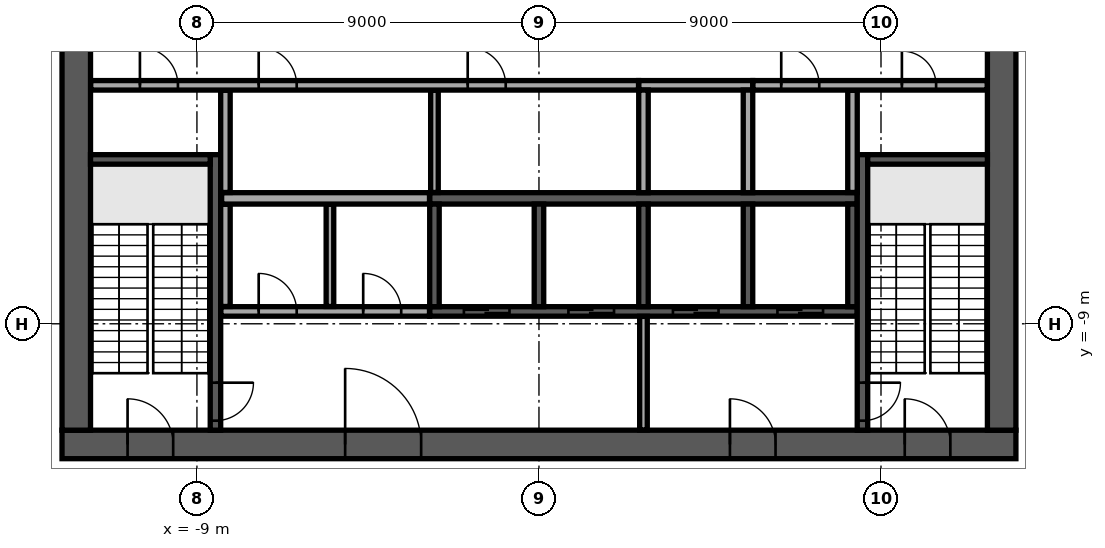
"""IFC4 building model, lengths in metres.
Left out: names, types, materials, properties, quantities, classifications, styles, units other than length and angle.
Written with IfcOpenShell. Run it as: python <this file> out.ifc"""

import sys

from ifc_helpers import new_model, si_unit, direction, frame, frame_2d, origin, place, context, subcontext, project, spatial, rectangle, extrude, element, fill, save


model = new_model("IFC4")
c1 = context("Model", 3, precision=1e-05, world=origin(), true_north=direction((0.0, 1.0)))
c2 = subcontext(c1, "Body", "Model", "MODEL_VIEW")
j1 = project(units=[si_unit("LENGTHUNIT", "METRE"), si_unit("PLANEANGLEUNIT", "RADIAN")], contexts=[c1])
p1 = place(None, origin())
s1 = spatial("IfcSite", under=j1, at=p1, CompositionType="ELEMENT")
p2 = place(p1, origin())
s2 = spatial("IfcBuilding", under=s1, at=p2, CompositionType="ELEMENT")
p3 = place(p2, frame((0.0, 0.0, 290.9)))
s3 = spatial("IfcBuildingStorey", under=s2, at=p3, CompositionType="ELEMENT", Elevation=290.9)
p4 = place(p3, frame((-12.55, -12.175, 0.0), z_axis=(0.0, 0.0, 1.0), x_axis=(1.0, 0.0, 0.0)))
e1 = element("IfcWall", 1, at=p4, inside=s3, PredefinedType="SHEAR", context=c2, shape_type="SweptSolid", body=[
    extrude(rectangle(XDim=25.1, YDim=0.75, at=frame_2d((12.55, 0.0))), origin(), (0.0, 0.0, 1.0), 5.25),
])
p5 = place(p4, frame((7.45, 0.0, 0.0)))
e2 = element("IfcOpeningElement", 2, at=p5, cuts=e1, PredefinedType="OPENING", context=c2, shape_type="SweptSolid", body=[
    extrude(rectangle(XDim=2.0, YDim=2.1, at=frame_2d((1.0, 1.05))), frame((0.0, 0.385, 0.0), z_axis=(0.0, -1.0, 0.0), x_axis=(1.0, 0.0, 0.0)), (0.0, 0.0, 1.0), 0.77),
])
p6 = place(p4, frame((17.575, 0.0, 0.0)))
e3 = element("IfcOpeningElement", 3, at=p6, cuts=e1, PredefinedType="OPENING", context=c2, shape_type="SweptSolid", body=[
    extrude(rectangle(XDim=1.2, YDim=2.1, at=frame_2d((0.6, 1.05))), frame((0.0, 0.385, 0.0), z_axis=(0.0, -1.0, 0.0), x_axis=(1.0, 0.0, 0.0)), (0.0, 0.0, 1.0), 0.77),
])
p7 = place(p4, frame((1.725, 0.0, 0.0)))
e4 = element("IfcOpeningElement", 4, at=p7, cuts=e1, PredefinedType="OPENING", context=c2, shape_type="SweptSolid", body=[
    extrude(rectangle(XDim=1.2, YDim=2.1, at=frame_2d((0.6, 1.05))), frame((0.0, 0.385, 0.0), z_axis=(0.0, -1.0, 0.0), x_axis=(1.0, 0.0, 0.0)), (0.0, 0.0, 1.0), 0.77),
])
p8 = place(p4, frame((22.175, 0.0, 0.0)))
e5 = element("IfcOpeningElement", 5, at=p8, cuts=e1, PredefinedType="OPENING", context=c2, shape_type="SweptSolid", body=[
    extrude(rectangle(XDim=1.2, YDim=2.1, at=frame_2d((0.6, 1.05))), frame((0.0, 0.385, 0.0), z_axis=(0.0, -1.0, 0.0), x_axis=(1.0, 0.0, 0.0)), (0.0, 0.0, 1.0), 0.77),
])
p9 = place(p3, frame((12.175, -11.8, 0.0), z_axis=(0.0, 0.0, 1.0), x_axis=(0.0, 1.0, 0.0)))
e6 = element("IfcWall", 6, at=p9, inside=s3, PredefinedType="SHEAR", context=c2, shape_type="SweptSolid", body=[
    extrude(rectangle(XDim=23.6, YDim=0.75, at=frame_2d((11.8, 0.0))), origin(), (0.0, 0.0, 1.0), 5.25),
])
p10 = place(p9, frame((10.6, 0.0, 0.0)))
e7 = element("IfcOpeningElement", 7, at=p10, cuts=e6, PredefinedType="OPENING", context=c2, shape_type="SweptSolid", body=[
    extrude(rectangle(XDim=2.4, YDim=2.4, at=frame_2d((1.2, 1.2))), frame((0.0, 0.385, 0.0), z_axis=(0.0, -1.0, 0.0), x_axis=(1.0, 0.0, 0.0)), (0.0, 0.0, 1.0), 0.77),
])
p11 = place(p3, frame((-12.175, -11.8, 0.0), z_axis=(0.0, 0.0, 1.0), x_axis=(0.0, 1.0, 0.0)))
e8 = element("IfcWall", 8, at=p11, inside=s3, PredefinedType="SHEAR", context=c2, shape_type="SweptSolid", body=[
    extrude(rectangle(XDim=23.6, YDim=0.75, at=frame_2d((11.8, 0.0))), origin(), (0.0, 0.0, 1.0), 5.25),
])
p12 = place(p11, frame((10.6, 0.0, 0.0)))
e9 = element("IfcOpeningElement", 9, at=p12, cuts=e8, PredefinedType="OPENING", context=c2, shape_type="SweptSolid", body=[
    extrude(rectangle(XDim=2.4, YDim=2.4, at=frame_2d((1.2, 1.2))), frame((0.0, 0.385, 0.0), z_axis=(0.0, -1.0, 0.0), x_axis=(1.0, 0.0, 0.0)), (0.0, 0.0, 1.0), 0.77),
])
p13 = place(p3, frame((-2.875, -5.7, 0.0), z_axis=(0.0, 0.0, 1.0), x_axis=(1.0, 0.0, 0.0)))
e10 = element("IfcWall", 10, at=p13, inside=s3, PredefinedType="SOLIDWALL", context=c2, shape_type="SweptSolid", body=[
    extrude(rectangle(XDim=11.25, YDim=0.3, at=frame_2d((5.625, 0.0))), origin(), (0.0, 0.0, 1.0), 5.25),
])
p14 = place(p3, frame((2.625, -2.725, 0.0), z_axis=(0.0, 0.0, 1.0), x_axis=(1.0, 0.0, 0.0)))
e11 = element("IfcWall", 11, at=p14, inside=s3, PredefinedType="SOLIDWALL", context=c2, shape_type="SweptSolid", body=[
    extrude(rectangle(XDim=3.0, YDim=0.25, at=frame_2d((1.5, 0.0))), origin(), (0.0, 0.0, 1.0), 5.25),
])
for number, where, z_axis, x_axis in (
    (12, (2.75, -5.55, 0.0), (0.0, 0.0, 1.0), (0.0, 1.0, 0.0)),
    (13, (5.5, -5.55, 0.0), (0.0, 0.0, 1.0), (0.0, 1.0, 0.0)),
):
    element("IfcWall", number, at=place(p3, frame(where, z_axis=z_axis, x_axis=x_axis)), inside=s3, PredefinedType="SOLIDWALL", context=c2, shape_type="SweptSolid", body=[
        extrude(rectangle(XDim=2.7, YDim=0.25, at=frame_2d((1.35, 0.0))), origin(), (0.0, 0.0, 1.0), 5.25),
    ])
p15 = place(p3, frame((-2.875, -8.675, 0.0), z_axis=(0.0, 0.0, 1.0), x_axis=(1.0, 0.0, 0.0)))
e14 = element("IfcWall", 14, at=p15, inside=s3, PredefinedType="SOLIDWALL", context=c2, shape_type="SweptSolid", body=[
    extrude(rectangle(XDim=11.25, YDim=0.25, at=frame_2d((5.625, 0.0))), origin(), (0.0, 0.0, 1.0), 5.25),
])
p16 = place(p15, frame((0.9, 0.0, 0.0)))
e15 = element("IfcOpeningElement", 15, at=p16, cuts=e14, PredefinedType="OPENING", context=c2, shape_type="SweptSolid", body=[
    extrude(rectangle(XDim=1.2, YDim=2.1, at=frame_2d((0.6, 1.05))), frame((0.0, 0.135, 0.0), z_axis=(0.0, -1.0, 0.0), x_axis=(1.0, 0.0, 0.0)), (0.0, 0.0, 1.0), 0.27),
])
p17 = place(p15, frame((3.65, 0.0, 0.0)))
e16 = element("IfcOpeningElement", 16, at=p17, cuts=e14, PredefinedType="OPENING", context=c2, shape_type="SweptSolid", body=[
    extrude(rectangle(XDim=1.2, YDim=2.1, at=frame_2d((0.6, 1.05))), frame((0.0, 0.135, 0.0), z_axis=(0.0, -1.0, 0.0), x_axis=(1.0, 0.0, 0.0)), (0.0, 0.0, 1.0), 0.27),
])
p18 = place(p15, frame((6.4, 0.0, 0.0)))
e17 = element("IfcOpeningElement", 17, at=p18, cuts=e14, PredefinedType="OPENING", context=c2, shape_type="SweptSolid", body=[
    extrude(rectangle(XDim=1.2, YDim=2.1, at=frame_2d((0.6, 1.05))), frame((0.0, 0.135, 0.0), z_axis=(0.0, -1.0, 0.0), x_axis=(1.0, 0.0, 0.0)), (0.0, 0.0, 1.0), 0.27),
])
p19 = place(p15, frame((9.15, 0.0, 0.0)))
e18 = element("IfcOpeningElement", 18, at=p19, cuts=e14, PredefinedType="OPENING", context=c2, shape_type="SweptSolid", body=[
    extrude(rectangle(XDim=1.2, YDim=2.1, at=frame_2d((0.6, 1.05))), frame((0.0, 0.135, 0.0), z_axis=(0.0, -1.0, 0.0), x_axis=(1.0, 0.0, 0.0)), (0.0, 0.0, 1.0), 0.27),
])
for number, where, z_axis, x_axis in (
    (19, (-2.75, -8.55, 0.0), (0.0, 0.0, 1.0), (0.0, 1.0, 0.0)),
    (20, (0.0, -8.55, 0.0), (0.0, 0.0, 1.0), (0.0, 1.0, 0.0)),
    (21, (2.75, -8.55, 0.0), (0.0, 0.0, 1.0), (0.0, 1.0, 0.0)),
    (22, (5.5, -8.55, 0.0), (0.0, 0.0, 1.0), (0.0, 1.0, 0.0)),
    (23, (8.25, -8.55, 0.0), (0.0, 0.0, 1.0), (0.0, 1.0, 0.0)),
):
    element("IfcWall", number, at=place(p3, frame(where, z_axis=z_axis, x_axis=x_axis)), inside=s3, PredefinedType="SOLIDWALL", context=c2, shape_type="SweptSolid", body=[
        extrude(rectangle(XDim=2.7, YDim=0.25, at=frame_2d((1.35, 0.0))), origin(), (0.0, 0.0, 1.0), 5.25),
    ])
p20 = place(p3, frame((-8.512, -4.55, 0.0), z_axis=(0.0, 0.0, 1.0), x_axis=(0.0, -1.0, 0.0)))
e24 = element("IfcWall", 24, at=p20, inside=s3, PredefinedType="SOLIDWALL", context=c2, shape_type="SweptSolid", body=[
    extrude(rectangle(XDim=7.25, YDim=0.275, at=frame_2d((3.625, 0.0))), origin(), (0.0, 0.0, 1.0), 5.25),
])
p21 = place(p20, frame((6.0, 0.0, 0.0)))
e25 = element("IfcOpeningElement", 25, at=p21, cuts=e24, PredefinedType="OPENING", context=c2, shape_type="SweptSolid", body=[
    extrude(rectangle(XDim=1.0, YDim=2.1, at=frame_2d((0.5, 1.05))), frame((0.0, 0.147, 0.0), z_axis=(0.0, -1.0, 0.0), x_axis=(1.0, 0.0, 0.0)), (0.0, 0.0, 1.0), 0.295),
])
p22 = place(p3, frame((-8.65, -4.675, 0.0), z_axis=(0.0, 0.0, 1.0), x_axis=(-1.0, 0.0, 0.0)))
e26 = element("IfcWall", 26, at=p22, inside=s3, PredefinedType="SOLIDWALL", context=c2, shape_type="SweptSolid", body=[
    extrude(rectangle(XDim=3.15, YDim=0.25, at=frame_2d((1.575, 0.0))), origin(), (0.0, 0.0, 1.0), 5.25),
])
p23 = place(p3, frame((8.512, -4.55, 0.0), z_axis=(0.0, 0.0, 1.0), x_axis=(0.0, -1.0, 0.0)))
e27 = element("IfcWall", 27, at=p23, inside=s3, PredefinedType="SOLIDWALL", context=c2, shape_type="SweptSolid", body=[
    extrude(rectangle(XDim=7.25, YDim=0.275, at=frame_2d((3.625, 0.0))), origin(), (0.0, 0.0, 1.0), 5.25),
])
p24 = place(p23, frame((6.0, 0.0, 0.0)))
e28 = element("IfcOpeningElement", 28, at=p24, cuts=e27, PredefinedType="OPENING", context=c2, shape_type="SweptSolid", body=[
    extrude(rectangle(XDim=1.0, YDim=2.1, at=frame_2d((0.5, 1.05))), frame((0.0, 0.147, 0.0), z_axis=(0.0, -1.0, 0.0), x_axis=(1.0, 0.0, 0.0)), (0.0, 0.0, 1.0), 0.295),
])
p25 = place(p3, frame((8.65, -4.675, 0.0), z_axis=(0.0, 0.0, 1.0), x_axis=(1.0, 0.0, 0.0)))
e29 = element("IfcWall", 29, at=p25, inside=s3, PredefinedType="SOLIDWALL", context=c2, shape_type="SweptSolid", body=[
    extrude(rectangle(XDim=3.15, YDim=0.25, at=frame_2d((1.575, 0.0))), origin(), (0.0, 0.0, 1.0), 5.25),
])
p26 = place(p3, frame((2.75, -11.795, 0.0), z_axis=(0.0, 0.0, 1.0), x_axis=(0.0, 1.0, 0.0)))
e30 = element("IfcWall", 30, at=p26, inside=s3, PredefinedType="PARTITIONING", context=c2, shape_type="SweptSolid", body=[
    extrude(rectangle(XDim=2.99, YDim=0.2, at=frame_2d((1.495, 0.0))), origin(), (0.0, 0.0, 1.0), 5.25),
])
p27 = place(p3, frame((-8.37, -8.675, 0.0), z_axis=(0.0, 0.0, 1.0), x_axis=(1.0, 0.0, 0.0)))
e31 = element("IfcWall", 31, at=p27, inside=s3, PredefinedType="PARTITIONING", context=c2, shape_type="SweptSolid", body=[
    extrude(rectangle(XDim=5.49, YDim=0.25, at=frame_2d((2.745, 0.0))), origin(), (0.0, 0.0, 1.0), 5.25),
])
p28 = place(p27, frame((0.995, 0.0, 0.0)))
e32 = element("IfcOpeningElement", 32, at=p28, cuts=e31, PredefinedType="OPENING", context=c2, shape_type="SweptSolid", body=[
    extrude(rectangle(XDim=1.0, YDim=2.1, at=frame_2d((0.5, 1.05))), frame((0.0, 0.135, 0.0), z_axis=(0.0, -1.0, 0.0), x_axis=(1.0, 0.0, 0.0)), (0.0, 0.0, 1.0), 0.27),
])
p29 = place(p27, frame((3.745, 0.0, 0.0)))
e33 = element("IfcOpeningElement", 33, at=p29, cuts=e31, PredefinedType="OPENING", context=c2, shape_type="SweptSolid", body=[
    extrude(rectangle(XDim=1.0, YDim=2.1, at=frame_2d((0.5, 1.05))), frame((0.0, 0.135, 0.0), z_axis=(0.0, -1.0, 0.0), x_axis=(1.0, 0.0, 0.0)), (0.0, 0.0, 1.0), 0.27),
])
p30 = place(p3, frame((-8.25, -8.545, 0.0), z_axis=(0.0, 0.0, 1.0), x_axis=(0.0, 1.0, 0.0)))
e34 = element("IfcWall", 34, at=p30, inside=s3, PredefinedType="PARTITIONING", context=c2, shape_type="SweptSolid", body=[
    extrude(rectangle(XDim=2.69, YDim=0.25, at=frame_2d((1.345, 0.0))), origin(), (0.0, 0.0, 1.0), 5.25),
])
p31 = place(p3, frame((-5.5, -8.545, 0.0), z_axis=(0.0, 0.0, 1.0), x_axis=(0.0, 1.0, 0.0)))
e35 = element("IfcWall", 35, at=p31, inside=s3, PredefinedType="PARTITIONING", context=c2, shape_type="SweptSolid", body=[
    extrude(rectangle(XDim=2.69, YDim=0.2, at=frame_2d((1.345, 0.0))), origin(), (0.0, 0.0, 1.0), 5.25),
])
p32 = place(p3, frame((-8.35, -5.7, 0.0), z_axis=(0.0, 0.0, 1.0), x_axis=(1.0, 0.0, 0.0)))
e36 = element("IfcWall", 36, at=p32, inside=s3, PredefinedType="PARTITIONING", context=c2, shape_type="SweptSolid", body=[
    extrude(rectangle(XDim=5.47, YDim=0.3, at=frame_2d((2.735, 0.0))), origin(), (0.0, 0.0, 1.0), 5.25),
])
p33 = place(p3, frame((-8.25, -5.545, 0.0), z_axis=(0.0, 0.0, 1.0), x_axis=(0.0, 1.0, 0.0)))
e37 = element("IfcWall", 37, at=p33, inside=s3, PredefinedType="PARTITIONING", context=c2, shape_type="SweptSolid", body=[
    extrude(rectangle(XDim=2.69, YDim=0.25, at=frame_2d((1.345, 0.0))), origin(), (0.0, 0.0, 1.0), 5.25),
])
p34 = place(p3, frame((-2.75, -5.545, 0.0), z_axis=(0.0, 0.0, 1.0), x_axis=(0.0, 1.0, 0.0)))
e38 = element("IfcWall", 38, at=p34, inside=s3, PredefinedType="PARTITIONING", context=c2, shape_type="SweptSolid", body=[
    extrude(rectangle(XDim=2.69, YDim=0.2, at=frame_2d((1.345, 0.0))), origin(), (0.0, 0.0, 1.0), 5.25),
])
p35 = place(p3, frame((8.25, -5.545, 0.0), z_axis=(0.0, 0.0, 1.0), x_axis=(0.0, 1.0, 0.0)))
e39 = element("IfcWall", 39, at=p35, inside=s3, PredefinedType="PARTITIONING", context=c2, shape_type="SweptSolid", body=[
    extrude(rectangle(XDim=2.69, YDim=0.25, at=frame_2d((1.345, 0.0))), origin(), (0.0, 0.0, 1.0), 5.25),
])
p36 = place(p3, frame((-11.795, -2.725, 0.0), z_axis=(0.0, 0.0, 1.0), x_axis=(1.0, 0.0, 0.0)))
e40 = element("IfcWall", 40, at=p36, inside=s3, PredefinedType="PARTITIONING", context=c2, shape_type="SweptSolid", body=[
    extrude(rectangle(XDim=14.415, YDim=0.25, at=frame_2d((7.208, 0.0))), origin(), (0.0, 0.0, 1.0), 5.25),
])
p37 = place(p36, frame((1.295, 0.0, 0.0)))
e41 = element("IfcOpeningElement", 41, at=p37, cuts=e40, PredefinedType="OPENING", context=c2, shape_type="SweptSolid", body=[
    extrude(rectangle(XDim=1.0, YDim=2.1, at=frame_2d((0.5, 1.05))), frame((0.0, 0.135, 0.0), z_axis=(0.0, -1.0, 0.0), x_axis=(1.0, 0.0, 0.0)), (0.0, 0.0, 1.0), 0.27),
])
p38 = place(p36, frame((4.42, 0.0, 0.0)))
e42 = element("IfcOpeningElement", 42, at=p38, cuts=e40, PredefinedType="OPENING", context=c2, shape_type="SweptSolid", body=[
    extrude(rectangle(XDim=1.0, YDim=2.1, at=frame_2d((0.5, 1.05))), frame((0.0, 0.135, 0.0), z_axis=(0.0, -1.0, 0.0), x_axis=(1.0, 0.0, 0.0)), (0.0, 0.0, 1.0), 0.27),
])
p39 = place(p36, frame((9.92, 0.0, 0.0)))
e43 = element("IfcOpeningElement", 43, at=p39, cuts=e40, PredefinedType="OPENING", context=c2, shape_type="SweptSolid", body=[
    extrude(rectangle(XDim=1.0, YDim=2.1, at=frame_2d((0.5, 1.05))), frame((0.0, 0.135, 0.0), z_axis=(0.0, -1.0, 0.0), x_axis=(1.0, 0.0, 0.0)), (0.0, 0.0, 1.0), 0.27),
])
p40 = place(p3, frame((5.63, -2.725, 0.0), z_axis=(0.0, 0.0, 1.0), x_axis=(1.0, 0.0, 0.0)))
e44 = element("IfcWall", 44, at=p40, inside=s3, PredefinedType="PARTITIONING", context=c2, shape_type="SweptSolid", body=[
    extrude(rectangle(XDim=6.165, YDim=0.25, at=frame_2d((3.083, 0.0))), origin(), (0.0, 0.0, 1.0), 5.25),
])
p41 = place(p40, frame((0.745, 0.0, 0.0)))
e45 = element("IfcOpeningElement", 45, at=p41, cuts=e44, PredefinedType="OPENING", context=c2, shape_type="SweptSolid", body=[
    extrude(rectangle(XDim=1.0, YDim=2.1, at=frame_2d((0.5, 1.05))), frame((0.0, 0.135, 0.0), z_axis=(0.0, -1.0, 0.0), x_axis=(1.0, 0.0, 0.0)), (0.0, 0.0, 1.0), 0.27),
])
p42 = place(p40, frame((3.92, 0.0, 0.0)))
e46 = element("IfcOpeningElement", 46, at=p42, cuts=e44, PredefinedType="OPENING", context=c2, shape_type="SweptSolid", body=[
    extrude(rectangle(XDim=0.9, YDim=2.1, at=frame_2d((0.45, 1.05))), frame((0.0, 0.135, 0.0), z_axis=(0.0, -1.0, 0.0), x_axis=(1.0, 0.0, 0.0)), (0.0, 0.0, 1.0), 0.27),
])
p43 = place(p3, frame((10.92, -31.952, 0.0), z_axis=(0.0, 0.0, 1.0), x_axis=(0.422622196878, 0.906305952042, 0.0)))
e47 = element("IfcWall", 47, at=p43, inside=s3, PredefinedType="STANDARD", context=c2, shape_type="SweptSolid", body=[
    extrude(rectangle(XDim=32.29, YDim=0.6, at=frame_2d((16.145, 0.0))), origin(), (0.0, 0.0, 1.0), 5.25),
])
p44 = place(p43, frame((1.213, 0.0, 0.6)))
e48 = element("IfcOpeningElement", 48, at=p44, cuts=e47, PredefinedType="OPENING", context=c2, shape_type="SweptSolid", body=[
    extrude(rectangle(XDim=2.0, YDim=4.2, at=frame_2d((1.0, 2.1))), frame((0.0, 0.31, 0.0), z_axis=(0.0, -1.0, 0.0), x_axis=(1.0, 0.0, 0.0)), (0.0, 0.0, 1.0), 0.62),
])
p45 = place(p5, origin())
e49 = element("IfcDoor", 49, at=p45, inside=s3, OperationType="SINGLE_SWING_LEFT", PredefinedType="DOOR", context=c2, shape_type="SweptSolid", body=[
    extrude(rectangle(XDim=2.0, YDim=2.1, at=frame_2d((1.0, 1.05))), frame((0.0, 0.025, 0.0), z_axis=(0.0, -1.0, 0.0), x_axis=(1.0, 0.0, 0.0)), (0.0, 0.0, 1.0), 0.05),
])
fill(e2, e49)
p46 = place(p6, origin())
e50 = element("IfcDoor", 50, at=p46, inside=s3, OperationType="SINGLE_SWING_LEFT", PredefinedType="DOOR", context=c2, shape_type="SweptSolid", body=[
    extrude(rectangle(XDim=1.2, YDim=2.1, at=frame_2d((0.6, 1.05))), frame((0.0, 0.025, 0.0), z_axis=(0.0, -1.0, 0.0), x_axis=(1.0, 0.0, 0.0)), (0.0, 0.0, 1.0), 0.05),
])
fill(e3, e50)
p47 = place(p7, origin())
e51 = element("IfcDoor", 51, at=p47, inside=s3, OperationType="SINGLE_SWING_LEFT", PredefinedType="DOOR", context=c2, shape_type="SweptSolid", body=[
    extrude(rectangle(XDim=1.2, YDim=2.1, at=frame_2d((0.6, 1.05))), frame((0.0, 0.025, 0.0), z_axis=(0.0, -1.0, 0.0), x_axis=(1.0, 0.0, 0.0)), (0.0, 0.0, 1.0), 0.05),
])
fill(e4, e51)
p48 = place(p8, origin())
e52 = element("IfcDoor", 52, at=p48, inside=s3, OperationType="SINGLE_SWING_LEFT", PredefinedType="DOOR", context=c2, shape_type="SweptSolid", body=[
    extrude(rectangle(XDim=1.2, YDim=2.1, at=frame_2d((0.6, 1.05))), frame((0.0, 0.025, 0.0), z_axis=(0.0, -1.0, 0.0), x_axis=(1.0, 0.0, 0.0)), (0.0, 0.0, 1.0), 0.05),
])
fill(e5, e52)
p49 = place(p16, origin())
e53 = element("IfcDoor", 53, at=p49, inside=s3, OperationType="DOUBLE_DOOR_SLIDING", PredefinedType="DOOR", context=c2, shape_type="SweptSolid", body=[
    extrude(rectangle(XDim=1.2, YDim=2.1, at=frame_2d((0.6, 1.05))), frame((0.0, 0.025, 0.0), z_axis=(0.0, -1.0, 0.0), x_axis=(1.0, 0.0, 0.0)), (0.0, 0.0, 1.0), 0.05),
])
fill(e15, e53)
p50 = place(p17, origin())
e54 = element("IfcDoor", 54, at=p50, inside=s3, OperationType="DOUBLE_DOOR_SLIDING", PredefinedType="DOOR", context=c2, shape_type="SweptSolid", body=[
    extrude(rectangle(XDim=1.2, YDim=2.1, at=frame_2d((0.6, 1.05))), frame((0.0, 0.025, 0.0), z_axis=(0.0, -1.0, 0.0), x_axis=(1.0, 0.0, 0.0)), (0.0, 0.0, 1.0), 0.05),
])
fill(e16, e54)
p51 = place(p18, origin())
e55 = element("IfcDoor", 55, at=p51, inside=s3, OperationType="DOUBLE_DOOR_SLIDING", PredefinedType="DOOR", context=c2, shape_type="SweptSolid", body=[
    extrude(rectangle(XDim=1.2, YDim=2.1, at=frame_2d((0.6, 1.05))), frame((0.0, 0.025, 0.0), z_axis=(0.0, -1.0, 0.0), x_axis=(1.0, 0.0, 0.0)), (0.0, 0.0, 1.0), 0.05),
])
fill(e17, e55)
p52 = place(p19, origin())
e56 = element("IfcDoor", 56, at=p52, inside=s3, OperationType="DOUBLE_DOOR_SLIDING", PredefinedType="DOOR", context=c2, shape_type="SweptSolid", body=[
    extrude(rectangle(XDim=1.2, YDim=2.1, at=frame_2d((0.6, 1.05))), frame((0.0, 0.025, 0.0), z_axis=(0.0, -1.0, 0.0), x_axis=(1.0, 0.0, 0.0)), (0.0, 0.0, 1.0), 0.05),
])
fill(e18, e56)
p53 = place(p21, origin())
e57 = element("IfcDoor", 57, at=p53, inside=s3, OperationType="SINGLE_SWING_LEFT", PredefinedType="DOOR", context=c2, shape_type="SweptSolid", body=[
    extrude(rectangle(XDim=1.0, YDim=2.1, at=frame_2d((0.5, 1.05))), frame((0.0, 0.025, 0.0), z_axis=(0.0, -1.0, 0.0), x_axis=(1.0, 0.0, 0.0)), (0.0, 0.0, 1.0), 0.05),
])
fill(e25, e57)
p54 = place(p24, origin())
e58 = element("IfcDoor", 58, at=p54, inside=s3, OperationType="SINGLE_SWING_LEFT", PredefinedType="DOOR", context=c2, shape_type="SweptSolid", body=[
    extrude(rectangle(XDim=1.0, YDim=2.1, at=frame_2d((0.5, 1.05))), frame((0.0, 0.025, 0.0), z_axis=(0.0, -1.0, 0.0), x_axis=(1.0, 0.0, 0.0)), (0.0, 0.0, 1.0), 0.05),
])
fill(e28, e58)
p55 = place(p28, origin())
e59 = element("IfcDoor", 59, at=p55, inside=s3, OperationType="SINGLE_SWING_RIGHT", PredefinedType="DOOR", context=c2, shape_type="SweptSolid", body=[
    extrude(rectangle(XDim=1.0, YDim=2.1, at=frame_2d((0.5, 1.05))), frame((0.0, 0.025, 0.0), z_axis=(0.0, -1.0, 0.0), x_axis=(1.0, 0.0, 0.0)), (0.0, 0.0, 1.0), 0.05),
])
fill(e32, e59)
p56 = place(p29, origin())
e60 = element("IfcDoor", 60, at=p56, inside=s3, OperationType="SINGLE_SWING_RIGHT", PredefinedType="DOOR", context=c2, shape_type="SweptSolid", body=[
    extrude(rectangle(XDim=1.0, YDim=2.1, at=frame_2d((0.5, 1.05))), frame((0.0, 0.025, 0.0), z_axis=(0.0, -1.0, 0.0), x_axis=(1.0, 0.0, 0.0)), (0.0, 0.0, 1.0), 0.05),
])
fill(e33, e60)
p57 = place(p37, origin())
e61 = element("IfcDoor", 61, at=p57, inside=s3, OperationType="SINGLE_SWING_RIGHT", PredefinedType="DOOR", context=c2, shape_type="SweptSolid", body=[
    extrude(rectangle(XDim=1.0, YDim=2.1, at=frame_2d((0.5, 1.05))), frame((0.0, 0.025, 0.0), z_axis=(0.0, -1.0, 0.0), x_axis=(1.0, 0.0, 0.0)), (0.0, 0.0, 1.0), 0.05),
])
fill(e41, e61)
p58 = place(p41, origin())
e62 = element("IfcDoor", 62, at=p58, inside=s3, OperationType="SINGLE_SWING_RIGHT", PredefinedType="DOOR", context=c2, shape_type="SweptSolid", body=[
    extrude(rectangle(XDim=1.0, YDim=2.1, at=frame_2d((0.5, 1.05))), frame((0.0, 0.025, 0.0), z_axis=(0.0, -1.0, 0.0), x_axis=(1.0, 0.0, 0.0)), (0.0, 0.0, 1.0), 0.05),
])
fill(e45, e62)
p59 = place(p42, origin())
e63 = element("IfcDoor", 63, at=p59, inside=s3, OperationType="SINGLE_SWING_RIGHT", PredefinedType="DOOR", context=c2, shape_type="SweptSolid", body=[
    extrude(rectangle(XDim=0.9, YDim=2.1, at=frame_2d((0.45, 1.05))), frame((0.0, 0.025, 0.0), z_axis=(0.0, -1.0, 0.0), x_axis=(1.0, 0.0, 0.0)), (0.0, 0.0, 1.0), 0.05),
])
fill(e46, e63)
p60 = place(p38, origin())
e64 = element("IfcDoor", 64, at=p60, inside=s3, OperationType="SINGLE_SWING_RIGHT", PredefinedType="DOOR", context=c2, shape_type="SweptSolid", body=[
    extrude(rectangle(XDim=1.0, YDim=2.1, at=frame_2d((0.5, 1.05))), frame((0.0, 0.025, 0.0), z_axis=(0.0, -1.0, 0.0), x_axis=(1.0, 0.0, 0.0)), (0.0, 0.0, 1.0), 0.05),
])
fill(e42, e64)
p61 = place(p39, origin())
e65 = element("IfcDoor", 65, at=p61, inside=s3, OperationType="SINGLE_SWING_RIGHT", PredefinedType="DOOR", context=c2, shape_type="SweptSolid", body=[
    extrude(rectangle(XDim=1.0, YDim=2.1, at=frame_2d((0.5, 1.05))), frame((0.0, 0.025, 0.0), z_axis=(0.0, -1.0, 0.0), x_axis=(1.0, 0.0, 0.0)), (0.0, 0.0, 1.0), 0.05),
])
fill(e43, e65)
save(model, sys.argv[1])
